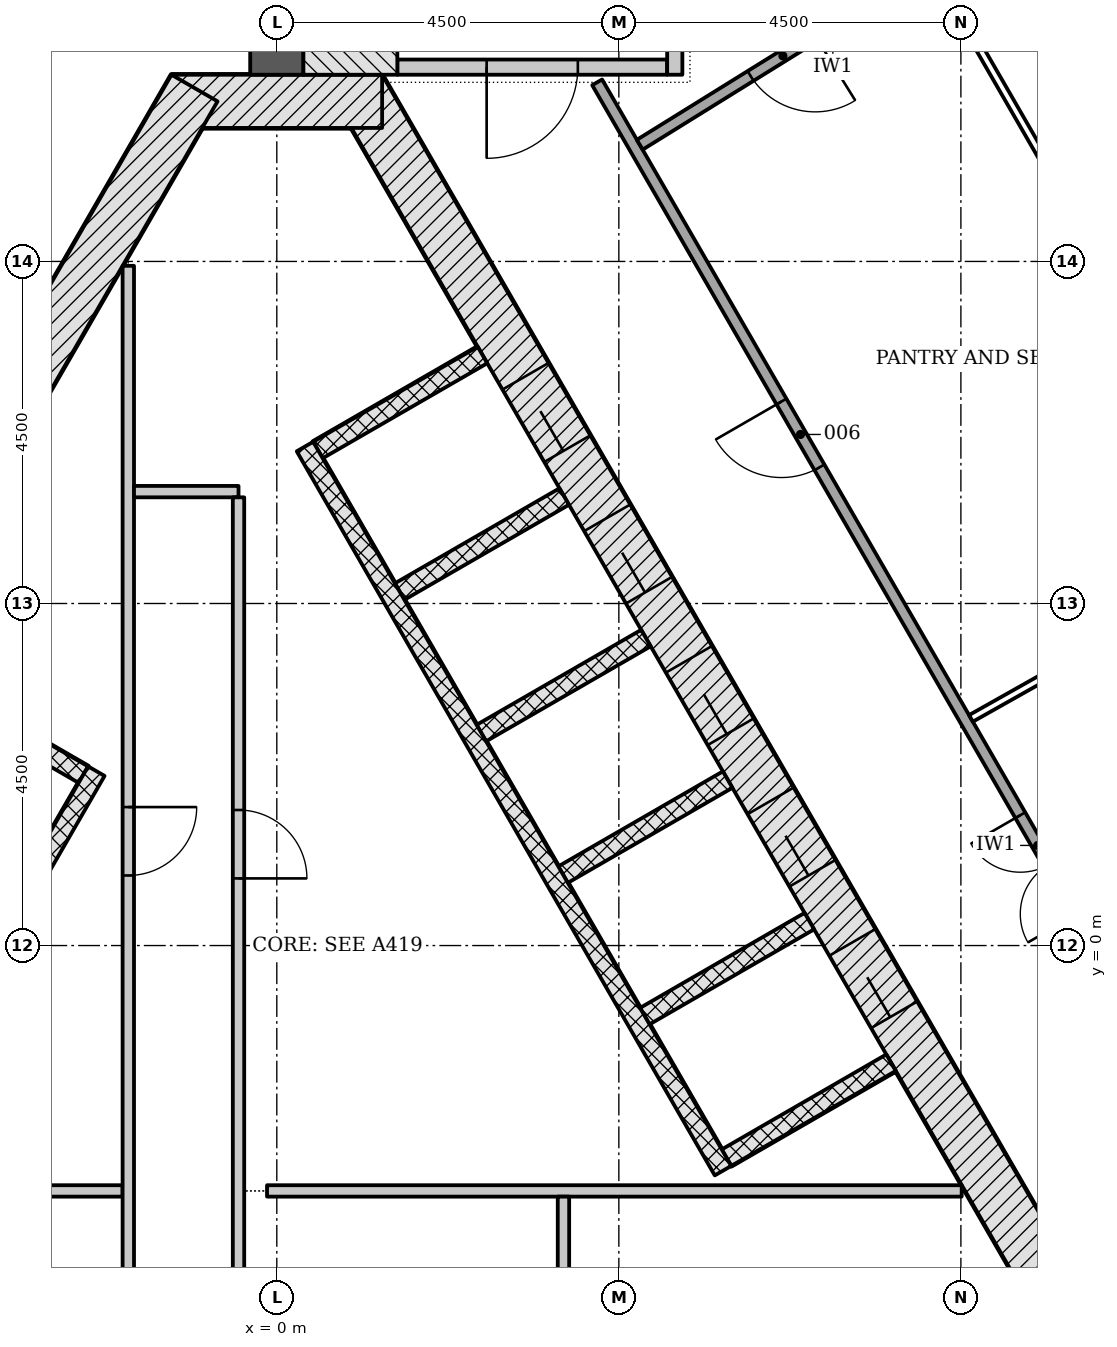
"""IFC4 building model, lengths in metres.
Left out: names, types, materials, properties, quantities, classifications, styles, units other than length and angle.
Written with IfcOpenShell. Run it as: python <this file> out.ifc"""

import sys

from ifc_helpers import new_model, si_unit, direction, frame, frame_2d, origin, place, context, subcontext, project, spatial, rectangle, extrude, element, fill, save


model = new_model("IFC4")
c1 = context("Model", 3, precision=1e-05, world=origin(), true_north=direction((0.0, 1.0)))
c2 = subcontext(c1, "Body", "Model", "MODEL_VIEW")
j1 = project(units=[si_unit("LENGTHUNIT", "METRE"), si_unit("PLANEANGLEUNIT", "RADIAN")], contexts=[c1])
p1 = place(None, origin())
s1 = spatial("IfcSite", under=j1, at=p1, CompositionType="ELEMENT")
p2 = place(p1, origin())
s2 = spatial("IfcBuilding", under=s1, at=p2, CompositionType="ELEMENT")
p3 = place(p2, frame((0.0, 0.0, 174.3)))
s3 = spatial("IfcBuildingStorey", under=s2, at=p3, CompositionType="ELEMENT", Elevation=174.3)
p4 = place(p3, frame((8.926, -6.753, -0.2), z_axis=(0.0, 0.0, 1.0), x_axis=(0.500042739161, 0.866000726912, 0.0)))
e1 = element("IfcWall", 1, at=p4, inside=s3, PredefinedType="SHEAR", context=c2, shape_type="SweptSolid", body=[
    extrude(rectangle(XDim=2.771, YDim=0.7, at=frame_2d((1.386, 0.0))), origin(), (0.0, 0.0, 1.0), 3.6),
])
p5 = place(p3, frame((10.311, -4.703, -0.2), z_axis=(0.0, 0.0, 1.0), x_axis=(-0.500001446645, 0.866024568562, 0.0)))
e2 = element("IfcWall", 2, at=p5, inside=s3, PredefinedType="SHEAR", context=c2, shape_type="SweptSolid", body=[
    extrude(rectangle(XDim=18.458, YDim=0.7, at=frame_2d((9.229, 0.0))), origin(), (0.0, 0.0, 1.0), 3.6),
])
p6 = place(p5, frame((4.379, 0.0, 0.2)))
e3 = element("IfcOpeningElement", 3, at=p6, cuts=e2, PredefinedType="OPENING", context=c2, shape_type="SweptSolid", body=[
    extrude(rectangle(XDim=1.1, YDim=2.1, at=frame_2d((0.55, 1.05))), frame((0.0, 0.36, 0.0), z_axis=(0.0, -1.0, 0.0), x_axis=(1.0, 0.0, 0.0)), (0.0, 0.0, 1.0), 0.72),
])
p7 = place(p5, frame((6.529, 0.0, 0.2)))
e4 = element("IfcOpeningElement", 4, at=p7, cuts=e2, PredefinedType="OPENING", context=c2, shape_type="SweptSolid", body=[
    extrude(rectangle(XDim=1.1, YDim=2.1, at=frame_2d((0.55, 1.05))), frame((0.0, 0.36, 0.0), z_axis=(0.0, -1.0, 0.0), x_axis=(1.0, 0.0, 0.0)), (0.0, 0.0, 1.0), 0.72),
])
p8 = place(p5, frame((8.679, 0.0, 0.2)))
e5 = element("IfcOpeningElement", 5, at=p8, cuts=e2, PredefinedType="OPENING", context=c2, shape_type="SweptSolid", body=[
    extrude(rectangle(XDim=1.1, YDim=2.1, at=frame_2d((0.55, 1.05))), frame((0.0, 0.36, 0.0), z_axis=(0.0, -1.0, 0.0), x_axis=(1.0, 0.0, 0.0)), (0.0, 0.0, 1.0), 0.72),
])
p9 = place(p5, frame((10.829, 0.0, 0.2)))
e6 = element("IfcOpeningElement", 6, at=p9, cuts=e2, PredefinedType="OPENING", context=c2, shape_type="SweptSolid", body=[
    extrude(rectangle(XDim=1.1, YDim=2.1, at=frame_2d((0.55, 1.05))), frame((0.0, 0.36, 0.0), z_axis=(0.0, -1.0, 0.0), x_axis=(1.0, 0.0, 0.0)), (0.0, 0.0, 1.0), 0.72),
])
p10 = place(p5, frame((12.979, 0.0, 0.2)))
e7 = element("IfcOpeningElement", 7, at=p10, cuts=e2, PredefinedType="OPENING", context=c2, shape_type="SweptSolid", body=[
    extrude(rectangle(XDim=1.1, YDim=2.1, at=frame_2d((0.55, 1.05))), frame((0.0, 0.36, 0.0), z_axis=(0.0, -1.0, 0.0), x_axis=(1.0, 0.0, 0.0)), (0.0, 0.0, 1.0), 0.72),
])
p11 = place(p3, frame((1.386, 11.106, -0.2), z_axis=(0.0, 0.0, 1.0), x_axis=(-1.0, 0.0, 0.0)))
e8 = element("IfcWall", 8, at=p11, inside=s3, PredefinedType="SHEAR", context=c2, shape_type="SweptSolid", body=[
    extrude(rectangle(XDim=2.771, YDim=0.7, at=frame_2d((1.386, 0.0))), origin(), (0.0, 0.0, 1.0), 3.6),
])
p12 = place(p3, frame((-1.083, 11.281, -0.2), z_axis=(0.0, 0.0, 1.0), x_axis=(-0.500001446645, -0.866024568562, 0.0)))
e9 = element("IfcWall", 9, at=p12, inside=s3, PredefinedType="SHEAR", context=c2, shape_type="SweptSolid", body=[
    extrude(rectangle(XDim=18.458, YDim=0.7, at=frame_2d((9.229, 0.0))), origin(), (0.0, 0.0, 1.0), 3.6),
])
p13 = place(p12, frame((8.979, 0.0, 0.2)))
e10 = element("IfcOpeningElement", 10, at=p13, cuts=e9, PredefinedType="OPENING", context=c2, shape_type="SweptSolid", body=[
    extrude(rectangle(XDim=1.2, YDim=2.1, at=frame_2d((0.6, 1.05))), frame((0.0, 0.36, 0.0), z_axis=(0.0, -1.0, 0.0), x_axis=(1.0, 0.0, 0.0)), (0.0, 0.0, 1.0), 0.72),
])
p14 = place(p12, frame((11.029, 0.0, 0.2)))
e11 = element("IfcOpeningElement", 11, at=p14, cuts=e9, PredefinedType="OPENING", context=c2, shape_type="SweptSolid", body=[
    extrude(rectangle(XDim=1.2, YDim=2.1, at=frame_2d((0.6, 1.05))), frame((0.0, 0.36, 0.0), z_axis=(0.0, -1.0, 0.0), x_axis=(1.0, 0.0, 0.0)), (0.0, 0.0, 1.0), 0.72),
])
p15 = place(p3, frame((0.0, 11.456, -0.2), z_axis=(0.0, 0.0, 1.0), x_axis=(0.0, 1.0, 0.0)))
e12 = element("IfcWall", 12, at=p15, inside=s3, PredefinedType="SHEAR", context=c2, shape_type="SweptSolid", body=[
    extrude(rectangle(XDim=9.928, YDim=0.7, at=frame_2d((4.964, 0.0))), origin(), (0.0, 0.0, 1.0), 3.6),
])
for number, where, z_axis, x_axis in (
    (13, (8.081, -1.541, -0.2), (0.0, 0.0, 1.0), (-0.866, -0.5, 0.0)),
    (14, (7.006, 0.321, -0.2), (0.0, 0.0, 1.0), (-0.866, -0.5, 0.0)),
):
    element("IfcWall", number, at=place(p3, frame(where, z_axis=z_axis, x_axis=x_axis)), inside=s3, PredefinedType="PARTITIONING", context=c2, shape_type="SweptSolid", body=[
        extrude(rectangle(XDim=2.5, YDim=0.25, at=frame_2d((1.25, 0.0))), origin(), (0.0, 0.0, 1.0), 3.6),
    ])
p16 = place(p3, frame((5.931, 2.183, -0.2), z_axis=(0.0, 0.0, 1.0), x_axis=(-0.866047370643, -0.499961950354, 0.0)))
e15 = element("IfcWall", 15, at=p16, inside=s3, PredefinedType="PARTITIONING", context=c2, shape_type="SweptSolid", body=[
    extrude(rectangle(XDim=2.5, YDim=0.25, at=frame_2d((1.25, 0.0))), origin(), (0.0, 0.0, 1.0), 3.6),
])
for number, where, z_axis, x_axis in (
    (16, (4.856, 4.045, -0.2), (0.0, 0.0, 1.0), (-0.866, -0.5, 0.0)),
    (17, (3.781, 5.907, -0.2), (0.0, 0.0, 1.0), (-0.866, -0.5, 0.0)),
    (18, (2.706, 7.769, -0.2), (0.0, 0.0, 1.0), (-0.866, -0.5, 0.0)),
):
    element("IfcWall", number, at=place(p3, frame(where, z_axis=z_axis, x_axis=x_axis)), inside=s3, PredefinedType="PARTITIONING", context=c2, shape_type="SweptSolid", body=[
        extrude(rectangle(XDim=2.5, YDim=0.25, at=frame_2d((1.25, 0.0))), origin(), (0.0, 0.0, 1.0), 3.6),
    ])
p17 = place(p3, frame((5.87, -2.961, 0.0), z_axis=(0.0, 0.0, 1.0), x_axis=(-0.50000615651, 0.866021849293, 0.0)))
e19 = element("IfcWall", 19, at=p17, inside=s3, PredefinedType="PARTITIONING", context=c2, shape_type="SweptSolid", body=[
    extrude(rectangle(XDim=11.0, YDim=0.25, at=frame_2d((5.5, 0.0))), origin(), (0.0, 0.0, 1.0), 3.4),
])
p18 = place(p3, frame((-5.056, 3.699, -0.2), z_axis=(0.0, 0.0, 1.0), x_axis=(0.866032775405, -0.499987231761, 0.0)))
e20 = element("IfcWall", 20, at=p18, inside=s3, PredefinedType="PARTITIONING", context=c2, shape_type="SweptSolid", body=[
    extrude(rectangle(XDim=2.9, YDim=0.25, at=frame_2d((1.45, 0.0))), origin(), (0.0, 0.0, 1.0), 3.6),
])
p19 = place(p3, frame((-2.374, 2.294, 0.0), z_axis=(0.0, 0.0, 1.0), x_axis=(-0.500003174267, -0.866023571113, 0.0)))
e21 = element("IfcWall", 21, at=p19, inside=s3, PredefinedType="PARTITIONING", context=c2, shape_type="SweptSolid", body=[
    extrude(rectangle(XDim=6.7, YDim=0.25, at=frame_2d((3.35, 0.0))), origin(), (0.0, 0.0, 1.0), 3.4),
])
p20 = place(p3, frame((-5.373, -3.228, 0.0), z_axis=(0.0, 0.0, 1.0), x_axis=(1.0, 0.0, 0.0)))
e22 = element("IfcWall", 22, at=p20, inside=s3, PredefinedType="PARTITIONING", context=c2, shape_type="SweptSolid", body=[
    extrude(rectangle(XDim=3.344, YDim=0.15, at=frame_2d((1.672, 0.0))), origin(), (0.0, 0.0, 1.0), 3.4),
])
p21 = place(p3, frame((-1.954, 8.942, 0.0), z_axis=(0.0, 0.0, 1.0), x_axis=(0.0, -1.0, 0.0)))
e23 = element("IfcWall", 23, at=p21, inside=s3, PredefinedType="PARTITIONING", context=c2, shape_type="SweptSolid", body=[
    extrude(rectangle(XDim=15.171, YDim=0.15, at=frame_2d((7.585, 0.0))), origin(), (0.0, 0.0, 1.0), 3.4),
])
p22 = place(p21, frame((7.121, 0.0, 0.0)))
e24 = element("IfcOpeningElement", 24, at=p22, cuts=e23, PredefinedType="OPENING", context=c2, shape_type="SweptSolid", body=[
    extrude(rectangle(XDim=0.9, YDim=2.1, at=frame_2d((0.45, 1.05))), frame((0.0, 0.085, 0.0), z_axis=(0.0, -1.0, 0.0), x_axis=(1.0, 0.0, 0.0)), (0.0, 0.0, 1.0), 0.17),
])
p23 = place(p3, frame((-1.879, 5.972, 0.0), z_axis=(0.0, 0.0, 1.0), x_axis=(1.0, 0.0, 0.0)))
e25 = element("IfcWall", 25, at=p23, inside=s3, PredefinedType="PARTITIONING", context=c2, shape_type="SweptSolid", body=[
    extrude(rectangle(XDim=1.375, YDim=0.15, at=frame_2d((0.688, 0.0))), origin(), (0.0, 0.0, 1.0), 3.4),
])
p24 = place(p3, frame((-0.504, 5.897, 0.0), z_axis=(0.0, 0.0, 1.0), x_axis=(0.0, -1.0, 0.0)))
e26 = element("IfcWall", 26, at=p24, inside=s3, PredefinedType="PARTITIONING", context=c2, shape_type="SweptSolid", body=[
    extrude(rectangle(XDim=12.125, YDim=0.15, at=frame_2d((6.062, 0.0))), origin(), (0.0, 0.0, 1.0), 3.4),
])
p25 = place(p24, frame((4.114, 0.0, 0.0)))
e27 = element("IfcOpeningElement", 27, at=p25, cuts=e26, PredefinedType="OPENING", context=c2, shape_type="SweptSolid", body=[
    extrude(rectangle(XDim=0.9, YDim=2.1, at=frame_2d((0.45, 1.05))), frame((0.0, 0.085, 0.0), z_axis=(0.0, -1.0, 0.0), x_axis=(1.0, 0.0, 0.0)), (0.0, 0.0, 1.0), 0.17),
])
p26 = place(p3, frame((-0.129, -3.228, 0.0), z_axis=(0.0, 0.0, 1.0), x_axis=(1.0, 0.0, 0.0)))
e28 = element("IfcWall", 28, at=p26, inside=s3, PredefinedType="PARTITIONING", context=c2, shape_type="SweptSolid", body=[
    extrude(rectangle(XDim=9.139, YDim=0.15, at=frame_2d((4.57, 0.0))), origin(), (0.0, 0.0, 1.0), 3.4),
])
p27 = place(p3, frame((3.771, -3.303, 0.0), z_axis=(0.0, 0.0, 1.0), x_axis=(0.0, -1.0, 0.0)))
e29 = element("IfcWall", 29, at=p27, inside=s3, PredefinedType="PARTITIONING", context=c2, shape_type="SweptSolid", body=[
    extrude(rectangle(XDim=2.925, YDim=0.15, at=frame_2d((1.462, 0.0))), origin(), (0.0, 0.0, 1.0), 3.4),
])
p28 = place(p3, frame((5.135, 11.556, -0.2), z_axis=(0.0, 0.0, 1.0), x_axis=(-1.0, 0.0, 0.0)))
e30 = element("IfcWall", 30, at=p28, inside=s3, PredefinedType="SHEAR", context=c2, shape_type="SweptSolid", body=[
    extrude(rectangle(XDim=3.55, YDim=0.2, at=frame_2d((1.775, 0.0))), origin(), (0.0, 0.0, 1.0), 3.6),
])
p29 = place(p28, frame((1.175, 0.0, 0.2)))
e31 = element("IfcOpeningElement", 31, at=p29, cuts=e30, PredefinedType="OPENING", context=c2, shape_type="SweptSolid", body=[
    extrude(rectangle(XDim=1.2, YDim=2.1, at=frame_2d((0.6, 1.05))), frame((0.0, 0.11, 0.0), z_axis=(0.0, -1.0, 0.0), x_axis=(1.0, 0.0, 0.0)), (0.0, 0.0, 1.0), 0.22),
])
p30 = place(p3, frame((5.236, 11.456, -0.2), z_axis=(0.0, 0.0, 1.0), x_axis=(0.0, 1.0, 0.0)))
e32 = element("IfcWall", 32, at=p30, inside=s3, PredefinedType="SHEAR", context=c2, shape_type="SweptSolid", body=[
    extrude(rectangle(XDim=5.6, YDim=0.2, at=frame_2d((2.8, 0.0))), origin(), (0.0, 0.0, 1.0), 3.6),
])
p31 = place(p30, frame((0.45, 0.0, 0.2)))
e33 = element("IfcOpeningElement", 33, at=p31, cuts=e32, PredefinedType="OPENING", context=c2, shape_type="SweptSolid", body=[
    extrude(rectangle(XDim=1.2, YDim=2.1, at=frame_2d((0.6, 1.05))), frame((0.0, 0.11, 0.0), z_axis=(0.0, -1.0, 0.0), x_axis=(1.0, 0.0, 0.0)), (0.0, 0.0, 1.0), 0.22),
])
p32 = place(p3, frame((0.968, 11.456, -0.2), z_axis=(0.0, 0.0, 1.0), x_axis=(0.0, 1.0, 0.0)))
e34 = element("IfcWall", 34, at=p32, inside=s3, PredefinedType="SHEAR", context=c2, shape_type="SweptSolid", body=[
    extrude(rectangle(XDim=7.2, YDim=1.236, at=frame_2d((3.6, 0.0))), origin(), (0.0, 0.0, 1.0), 3.6),
])
p33 = place(p3, frame((15.807, -8.722, 0.0), z_axis=(0.0, 0.0, 1.0), x_axis=(-0.500001078133, 0.866024781323, 0.0)))
e35 = element("IfcWall", 35, at=p33, inside=s3, PredefinedType="PARTITIONING", context=c2, shape_type="SweptSolid", body=[
    extrude(rectangle(XDim=23.185, YDim=0.15, at=frame_2d((11.592, 0.0))), origin(), (0.0, 0.0, 1.0), 2.847),
])
p34 = place(p33, frame((10.551, 0.0, 0.0)))
e36 = element("IfcOpeningElement", 36, at=p34, cuts=e35, PredefinedType="OPENING", context=c2, shape_type="SweptSolid", body=[
    extrude(rectangle(XDim=1.5, YDim=2.1, at=frame_2d((0.75, 1.05))), frame((0.0, 0.085, 0.0), z_axis=(0.0, -1.0, 0.0), x_axis=(1.0, 0.0, 0.0)), (0.0, 0.0, 1.0), 0.17),
])
p35 = place(p33, frame((17.335, 0.0, 0.0)))
e37 = element("IfcOpeningElement", 37, at=p35, cuts=e35, PredefinedType="OPENING", context=c2, shape_type="SweptSolid", body=[
    extrude(rectangle(XDim=1.0, YDim=2.1, at=frame_2d((0.5, 1.05))), frame((0.0, 0.085, 0.0), z_axis=(0.0, -1.0, 0.0), x_axis=(1.0, 0.0, 0.0)), (0.0, 0.0, 1.0), 0.17),
])
p36 = place(p3, frame((9.856, 13.688, 0.0), z_axis=(0.0, 0.0, 1.0), x_axis=(-0.849698198213, -0.527269354271, 0.0)))
e38 = element("IfcWall", 38, at=p36, inside=s3, PredefinedType="PARTITIONING", context=c2, shape_type="SweptSolid", body=[
    extrude(rectangle(XDim=5.979, YDim=0.15, at=frame_2d((2.99, 0.0))), origin(), (0.0, 0.0, 1.0), 3.4),
])
p37 = place(p36, frame((3.264, 0.0, 0.0)))
e39 = element("IfcOpeningElement", 39, at=p37, cuts=e38, PredefinedType="OPENING", context=c2, shape_type="SweptSolid", body=[
    extrude(rectangle(XDim=1.0, YDim=2.1, at=frame_2d((0.5, 1.05))), frame((0.0, 0.085, 0.0), z_axis=(0.0, -1.0, 0.0), x_axis=(1.0, 0.0, 0.0)), (0.0, 0.0, 1.0), 0.17),
])
p38 = place(p3, frame((9.133, 2.989, 0.0), z_axis=(0.0, 0.0, 1.0), x_axis=(0.871281573597, 0.490783475181, 0.0)))
e40 = element("IfcWall", 40, at=p38, inside=s3, PredefinedType="PARTITIONING", context=c2, shape_type="SweptSolid", body=[
    extrude(rectangle(XDim=4.505, YDim=0.1, at=frame_2d((2.252, 0.0))), origin(), (0.0, 0.0, 1.0), 3.4),
])
p39 = place(p3, frame((13.032, 5.243, 0.0), z_axis=(0.0, 0.0, 1.0), x_axis=(-0.499996840937, 0.866027227663, 0.0)))
e41 = element("IfcWall", 41, at=p39, inside=s3, PredefinedType="PARTITIONING", context=c2, shape_type="SweptSolid", body=[
    extrude(rectangle(XDim=8.78, YDim=0.1, at=frame_2d((4.39, 0.0))), origin(), (0.0, 0.0, 1.0), 2.847),
])
p40 = place(p39, frame((3.903, 0.0, 0.0)))
e42 = element("IfcOpeningElement", 42, at=p40, cuts=e41, PredefinedType="OPENING", context=c2, shape_type="SweptSolid", body=[
    extrude(rectangle(XDim=1.0, YDim=2.1, at=frame_2d((0.5, 1.05))), frame((0.0, 0.06, 0.0), z_axis=(0.0, -1.0, 0.0), x_axis=(1.0, 0.0, 0.0)), (0.0, 0.0, 1.0), 0.12),
])
p41 = place(p3, frame((-0.35, 18.85, 0.0), z_axis=(0.0, 0.0, 1.0), x_axis=(-0.499985463203, -0.866033796445, 0.0)))
e43 = element("IfcWall", 43, at=p41, inside=s3, PredefinedType="PARTITIONING", context=c2, shape_type="SweptSolid", body=[
    extrude(rectangle(XDim=9.803, YDim=0.15, at=frame_2d((4.901, 0.0))), origin(), (0.0, 0.0, 1.0), 2.847),
])
p42 = place(p6, origin())
e44 = element("IfcDoor", 44, at=p42, inside=s3, OperationType="DOUBLE_DOOR_SLIDING", PredefinedType="DOOR", context=c2, shape_type="SweptSolid", body=[
    extrude(rectangle(XDim=1.1, YDim=2.1, at=frame_2d((0.55, 1.05))), frame((0.0, 0.025, 0.0), z_axis=(0.0, -1.0, 0.0), x_axis=(1.0, 0.0, 0.0)), (0.0, 0.0, 1.0), 0.05),
])
fill(e3, e44)
p43 = place(p7, origin())
e45 = element("IfcDoor", 45, at=p43, inside=s3, OperationType="DOUBLE_DOOR_SLIDING", PredefinedType="DOOR", context=c2, shape_type="SweptSolid", body=[
    extrude(rectangle(XDim=1.1, YDim=2.1, at=frame_2d((0.55, 1.05))), frame((0.0, 0.025, 0.0), z_axis=(0.0, -1.0, 0.0), x_axis=(1.0, 0.0, 0.0)), (0.0, 0.0, 1.0), 0.05),
])
fill(e4, e45)
p44 = place(p8, origin())
e46 = element("IfcDoor", 46, at=p44, inside=s3, OperationType="DOUBLE_DOOR_SLIDING", PredefinedType="DOOR", context=c2, shape_type="SweptSolid", body=[
    extrude(rectangle(XDim=1.1, YDim=2.1, at=frame_2d((0.55, 1.05))), frame((0.0, 0.025, 0.0), z_axis=(0.0, -1.0, 0.0), x_axis=(1.0, 0.0, 0.0)), (0.0, 0.0, 1.0), 0.05),
])
fill(e5, e46)
p45 = place(p9, origin())
e47 = element("IfcDoor", 47, at=p45, inside=s3, OperationType="DOUBLE_DOOR_SLIDING", PredefinedType="DOOR", context=c2, shape_type="SweptSolid", body=[
    extrude(rectangle(XDim=1.1, YDim=2.1, at=frame_2d((0.55, 1.05))), frame((0.0, 0.025, 0.0), z_axis=(0.0, -1.0, 0.0), x_axis=(1.0, 0.0, 0.0)), (0.0, 0.0, 1.0), 0.05),
])
fill(e6, e47)
p46 = place(p10, origin())
e48 = element("IfcDoor", 48, at=p46, inside=s3, OperationType="DOUBLE_DOOR_SLIDING", PredefinedType="DOOR", context=c2, shape_type="SweptSolid", body=[
    extrude(rectangle(XDim=1.1, YDim=2.1, at=frame_2d((0.55, 1.05))), frame((0.0, 0.025, 0.0), z_axis=(0.0, -1.0, 0.0), x_axis=(1.0, 0.0, 0.0)), (0.0, 0.0, 1.0), 0.05),
])
fill(e7, e48)
p47 = place(p22, origin())
e49 = element("IfcDoor", 49, at=p47, inside=s3, OperationType="SINGLE_SWING_LEFT", PredefinedType="DOOR", context=c2, shape_type="SweptSolid", body=[
    extrude(rectangle(XDim=0.9, YDim=2.1, at=frame_2d((0.45, 1.05))), frame((0.0, 0.025, 0.0), z_axis=(0.0, -1.0, 0.0), x_axis=(1.0, 0.0, 0.0)), (0.0, 0.0, 1.0), 0.05),
])
fill(e24, e49)
p48 = place(p25, origin())
e50 = element("IfcDoor", 50, at=p48, inside=s3, OperationType="SINGLE_SWING_RIGHT", PredefinedType="DOOR", context=c2, shape_type="SweptSolid", body=[
    extrude(rectangle(XDim=0.9, YDim=2.1, at=frame_2d((0.45, 1.05))), frame((0.0, 0.025, 0.0), z_axis=(0.0, -1.0, 0.0), x_axis=(1.0, 0.0, 0.0)), (0.0, 0.0, 1.0), 0.05),
])
fill(e27, e50)
p49 = place(p29, origin())
e51 = element("IfcDoor", 51, at=p49, inside=s3, OperationType="SINGLE_SWING_RIGHT", PredefinedType="DOOR", context=c2, shape_type="SweptSolid", body=[
    extrude(rectangle(XDim=1.2, YDim=2.1, at=frame_2d((0.6, 1.05))), frame((0.0, 0.025, 0.0), z_axis=(0.0, -1.0, 0.0), x_axis=(1.0, 0.0, 0.0)), (0.0, 0.0, 1.0), 0.05),
])
fill(e31, e51)
p50 = place(p34, origin())
e52 = element("IfcDoor", 52, at=p50, inside=s3, OperationType="DOUBLE_DOOR_SINGLE_SWING", PredefinedType="DOOR", context=c2, shape_type="SweptSolid", body=[
    extrude(rectangle(XDim=1.5, YDim=2.1, at=frame_2d((0.75, 1.05))), frame((0.0, 0.025, 0.0), z_axis=(0.0, -1.0, 0.0), x_axis=(1.0, 0.0, 0.0)), (0.0, 0.0, 1.0), 0.05),
])
fill(e36, e52)
p51 = place(p35, origin())
e53 = element("IfcDoor", 53, at=p51, inside=s3, OperationType="SINGLE_SWING_RIGHT", PredefinedType="DOOR", context=c2, shape_type="SweptSolid", body=[
    extrude(rectangle(XDim=1.0, YDim=2.1, at=frame_2d((0.5, 1.05))), frame((0.0, 0.025, 0.0), z_axis=(0.0, -1.0, 0.0), x_axis=(1.0, 0.0, 0.0)), (0.0, 0.0, 1.0), 0.05),
])
fill(e37, e53)
p52 = place(p37, origin())
e54 = element("IfcDoor", 54, at=p52, inside=s3, OperationType="SINGLE_SWING_LEFT", PredefinedType="DOOR", context=c2, shape_type="SweptSolid", body=[
    extrude(rectangle(XDim=1.0, YDim=2.1, at=frame_2d((0.5, 1.05))), frame((0.0, 0.025, 0.0), z_axis=(0.0, -1.0, 0.0), x_axis=(1.0, 0.0, 0.0)), (0.0, 0.0, 1.0), 0.05),
])
fill(e39, e54)
save(model, sys.argv[1])
